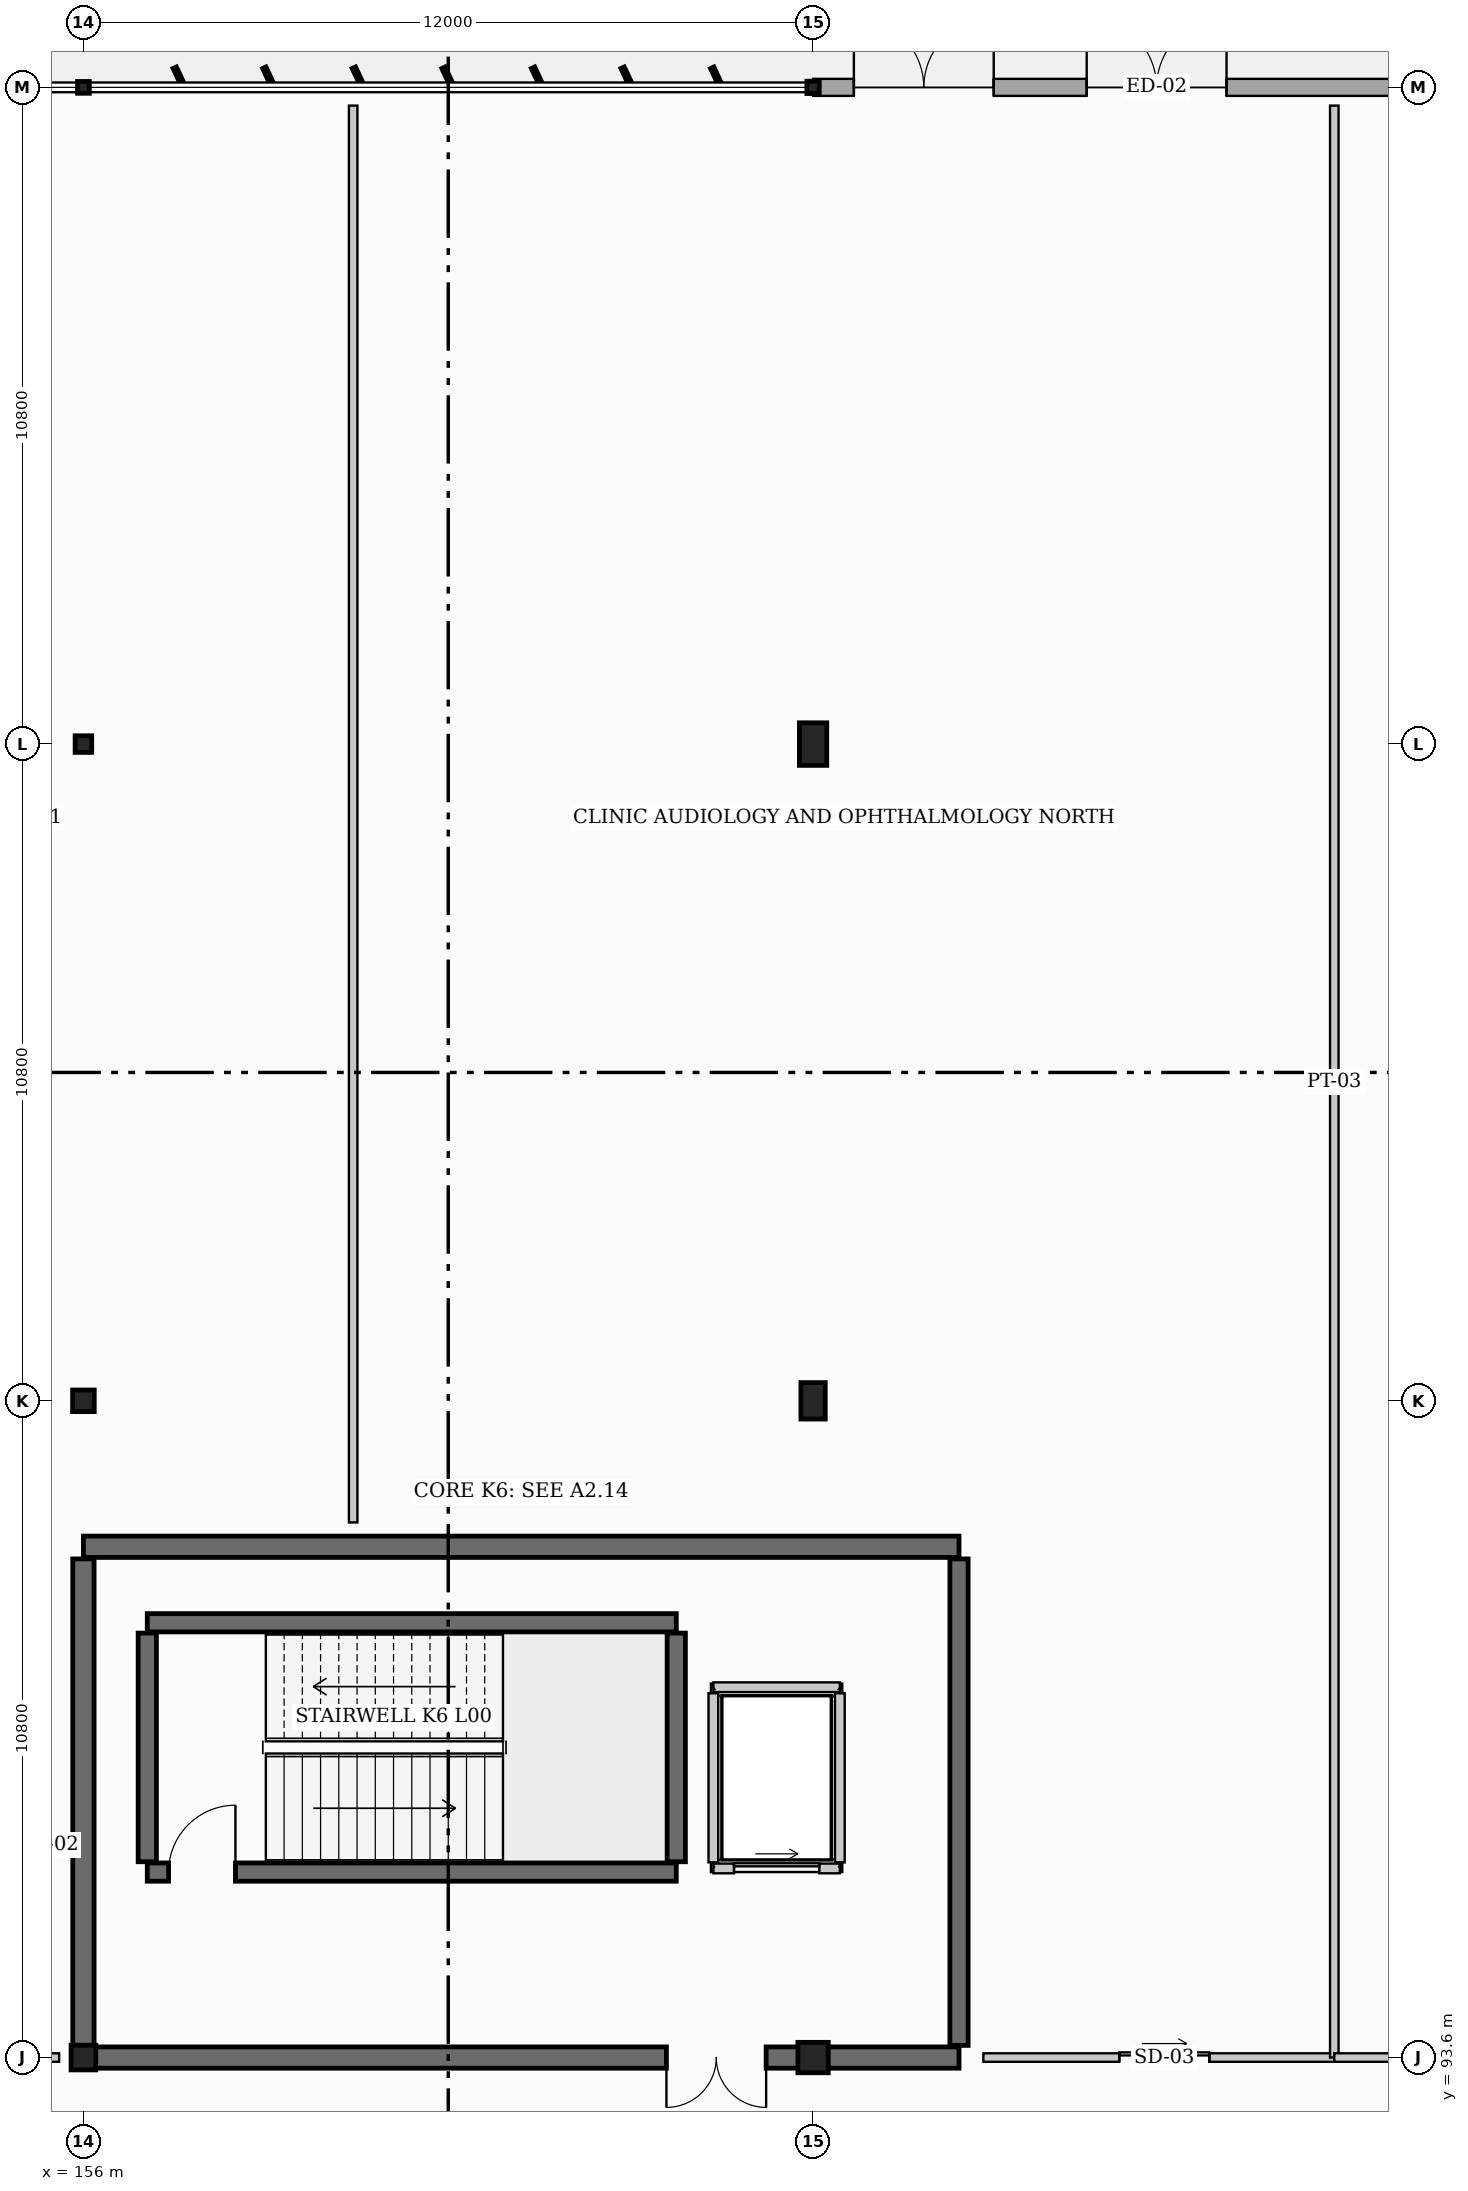
"""IFC4 building model, lengths in metres.
Left out: names, types, materials, properties, quantities, classifications, styles, units other than length and angle.
Written with IfcOpenShell. Run it as: python <this file> out.ifc"""

import sys

from ifc_helpers import new_model, si_unit, direction, frame, frame_2d, origin, origin_2d, place, context, subcontext, project, spatial, rectangle, hollow_circle, i_section, extrude, element, fill, save


model = new_model("IFC4")
c1 = context("Model", 3, precision=1e-05, world=origin(), true_north=direction((0.0, 1.0)))
c2 = subcontext(c1, "Body", "Model", "MODEL_VIEW")
j1 = project(units=[si_unit("LENGTHUNIT", "METRE"), si_unit("PLANEANGLEUNIT", "RADIAN")], contexts=[c1])
p1 = place(None, origin())
s1 = spatial("IfcSite", under=j1, at=p1, CompositionType="ELEMENT")
p2 = place(p1, origin())
s2 = spatial("IfcBuilding", under=s1, at=p2, CompositionType="ELEMENT")
p3 = place(p2, origin())
s3 = spatial("IfcBuildingStorey", under=s2, at=p3, CompositionType="ELEMENT", Elevation=0.0)
p4 = place(p3, frame((156.0, 93.6, 0.0), z_axis=(0.0, 0.0, 1.0), x_axis=(0.0, 1.0, 0.0)))
e1 = element("IfcColumn", 1, at=p4, inside=s3, PredefinedType="COLUMN", context=c2, shape_type="SweptSolid", body=[
    extrude(hollow_circle(Radius=0.203, WallThickness=0.016, at=origin_2d()), origin(), (0.0, 0.0, 1.0), 4.8),
])
p5 = place(p3, frame((156.0, 104.4, 0.0), z_axis=(0.0, 0.0, 1.0), x_axis=(0.0, 1.0, 0.0)))
e2 = element("IfcColumn", 2, at=p5, inside=s3, PredefinedType="COLUMN", context=c2, shape_type="SweptSolid", body=[
    extrude(hollow_circle(Radius=0.178, WallThickness=0.013, at=origin_2d()), origin(), (0.0, 0.0, 1.0), 4.8),
])
p6 = place(p3, frame((156.0, 115.2, 0.0), z_axis=(0.0, 0.0, 1.0), x_axis=(0.0, 1.0, 0.0)))
e3 = element("IfcColumn", 3, at=p6, inside=s3, PredefinedType="COLUMN", context=c2, shape_type="SweptSolid", body=[
    extrude(hollow_circle(Radius=0.136, WallThickness=0.013, at=origin_2d()), origin(), (0.0, 0.0, 1.0), 4.8),
])
p7 = place(p3, frame((156.0, 126.0, 0.0), z_axis=(0.0, 0.0, 1.0), x_axis=(0.0, 1.0, 0.0)))
e4 = element("IfcColumn", 4, at=p7, inside=s3, PredefinedType="COLUMN", context=c2, shape_type="SweptSolid", body=[
    extrude(hollow_circle(Radius=0.097, WallThickness=0.008, at=origin_2d()), origin(), (0.0, 0.0, 1.0), 4.8),
])
p8 = place(p3, frame((168.0, 93.6, 0.0), z_axis=(0.0, 0.0, 1.0), x_axis=(1.0, 0.0, 0.0)))
e5 = element("IfcColumn", 5, at=p8, inside=s3, PredefinedType="COLUMN", context=c2, shape_type="SweptSolid", body=[
    extrude(rectangle(XDim=0.5, YDim=0.5, at=origin_2d()), origin(), (0.0, 0.0, 1.0), 4.8),
])
p9 = place(p3, frame((168.0, 104.4, 0.0), z_axis=(0.0, 0.0, 1.0), x_axis=(1.0, 0.0, 0.0)))
e6 = element("IfcColumn", 6, at=p9, inside=s3, PredefinedType="PILASTER", context=c2, shape_type="SweptSolid", body=[
    extrude(rectangle(XDim=0.4, YDim=0.6, at=origin_2d()), origin(), (0.0, 0.0, 1.0), 4.8),
])
p10 = place(p3, frame((168.0, 115.2, 0.0), z_axis=(0.0, 0.0, 1.0), x_axis=(1.0, 0.0, 0.0)))
e7 = element("IfcColumn", 7, at=p10, inside=s3, PredefinedType="PILASTER", context=c2, shape_type="SweptSolid", body=[
    extrude(rectangle(XDim=0.45, YDim=0.7, at=origin_2d()), origin(), (0.0, 0.0, 1.0), 4.8),
])
p11 = place(p3, frame((168.0, 126.0, 0.0), z_axis=(0.0, 0.0, 1.0), x_axis=(1.0, 0.0, 0.0)))
e8 = element("IfcColumn", 8, at=p11, inside=s3, PredefinedType="COLUMN", context=c2, shape_type="SweptSolid", body=[
    extrude(i_section(OverallWidth=0.203, OverallDepth=0.203, WebThickness=0.007, FlangeThickness=0.011, at=origin_2d()), origin(), (0.0, 0.0, 1.0), 4.8),
])
p12 = place(p3, frame((156.0, 102.0, 0.0), z_axis=(0.0, 0.0, 1.0), x_axis=(1.0, 0.0, 0.0)))
e9 = element("IfcWall", 9, at=p12, inside=s3, PredefinedType="SHEAR", context=c2, shape_type="SweptSolid", body=[
    extrude(rectangle(XDim=14.4, YDim=0.35, at=frame_2d((7.2, 0.0))), origin(), (0.0, 0.0, 1.0), 4.8),
])
p13 = place(p3, frame((170.4, 93.6, 0.0), z_axis=(0.0, 0.0, 1.0), x_axis=(-1.0, 0.0, 0.0)))
e10 = element("IfcWall", 10, at=p13, inside=s3, PredefinedType="SHEAR", context=c2, shape_type="SweptSolid", body=[
    extrude(rectangle(XDim=14.4, YDim=0.35, at=frame_2d((7.2, 0.0))), origin(), (0.0, 0.0, 1.0), 4.8),
])
p14 = place(p13, frame((3.172, 0.0, 0.0)))
e11 = element("IfcOpeningElement", 11, at=p14, cuts=e10, PredefinedType="OPENING", context=c2, shape_type="SweptSolid", body=[
    extrude(rectangle(XDim=1.64, YDim=2.2, at=frame_2d((0.82, 1.1))), frame((0.0, 0.185, 0.0), z_axis=(0.0, -1.0, 0.0), x_axis=(1.0, 0.0, 0.0)), (0.0, 0.0, 1.0), 0.37),
])
p15 = place(p3, frame((156.0, 93.8, 0.0), z_axis=(0.0, 0.0, 1.0), x_axis=(0.0, 1.0, 0.0)))
e12 = element("IfcWall", 12, at=p15, inside=s3, PredefinedType="SHEAR", context=c2, shape_type="SweptSolid", body=[
    extrude(rectangle(XDim=8.0, YDim=0.35, at=frame_2d((4.0, 0.0))), origin(), (0.0, 0.0, 1.0), 4.8),
])
p16 = place(p3, frame((170.4, 101.8, 0.0), z_axis=(0.0, 0.0, 1.0), x_axis=(0.0, -1.0, 0.0)))
e13 = element("IfcWall", 13, at=p16, inside=s3, PredefinedType="SHEAR", context=c2, shape_type="SweptSolid", body=[
    extrude(rectangle(XDim=8.0, YDim=0.3, at=frame_2d((4.0, 0.0))), origin(), (0.0, 0.0, 1.0), 4.8),
])
p17 = place(p3, frame((157.05, 96.65, 0.0), z_axis=(0.0, 0.0, 1.0), x_axis=(1.0, 0.0, 0.0)))
e14 = element("IfcWall", 14, at=p17, inside=s3, PredefinedType="SHEAR", context=c2, shape_type="SweptSolid", body=[
    extrude(rectangle(XDim=8.7, YDim=0.3, at=frame_2d((4.35, 0.0))), origin(), (0.0, 0.0, 1.0), 4.8),
])
p18 = place(p17, frame((0.35, 0.0, 0.0)))
e15 = element("IfcOpeningElement", 15, at=p18, cuts=e14, PredefinedType="OPENING", context=c2, shape_type="SweptSolid", body=[
    extrude(rectangle(XDim=1.1, YDim=2.15, at=frame_2d((0.55, 1.075))), frame((0.0, 0.16, 0.0), z_axis=(0.0, -1.0, 0.0), x_axis=(1.0, 0.0, 0.0)), (0.0, 0.0, 1.0), 0.32),
])
p19 = place(p3, frame((165.75, 100.75, 0.0), z_axis=(0.0, 0.0, 1.0), x_axis=(-1.0, 0.0, 0.0)))
e16 = element("IfcWall", 16, at=p19, inside=s3, PredefinedType="SHEAR", context=c2, shape_type="SweptSolid", body=[
    extrude(rectangle(XDim=8.7, YDim=0.3, at=frame_2d((4.35, 0.0))), origin(), (0.0, 0.0, 1.0), 4.8),
])
for number, where, z_axis, x_axis in (
    (17, (157.05, 96.82, 0.0), (0.0, 0.0, 1.0), (0.0, 1.0, 0.0)),
    (18, (165.75, 96.82, 0.0), (0.0, 0.0, 1.0), (0.0, 1.0, 0.0)),
):
    element("IfcWall", number, at=place(p3, frame(where, z_axis=z_axis, x_axis=x_axis)), inside=s3, PredefinedType="SHEAR", context=c2, shape_type="SweptSolid", body=[
        extrude(rectangle(XDim=3.76, YDim=0.3, at=frame_2d((1.88, 0.0))), origin(), (0.0, 0.0, 1.0), 4.8),
    ])
p20 = place(p3, frame((168.0, 126.0, 0.0), z_axis=(0.0, 0.0, 1.0), x_axis=(1.0, 0.0, 0.0)))
e19 = element("IfcWall", 19, at=p20, inside=s3, PredefinedType="STANDARD", context=c2, shape_type="SweptSolid", body=[
    extrude(rectangle(XDim=24.0, YDim=0.28, at=frame_2d((12.0, 0.0))), origin(), (0.0, 0.0, 1.0), 3.53),
])
p21 = place(p20, frame((4.5, 0.0, 0.0)))
e20 = element("IfcOpeningElement", 20, at=p21, cuts=e19, PredefinedType="OPENING", context=c2, shape_type="SweptSolid", body=[
    extrude(rectangle(XDim=2.3, YDim=2.3, at=frame_2d((1.15, 1.15))), frame((0.0, 0.15, 0.0), z_axis=(0.0, -1.0, 0.0), x_axis=(1.0, 0.0, 0.0)), (0.0, 0.0, 1.0), 0.3),
])
p22 = place(p20, frame((0.671, 0.0, 0.0)))
e21 = element("IfcOpeningElement", 21, at=p22, cuts=e19, PredefinedType="OPENING", context=c2, shape_type="SweptSolid", body=[
    extrude(rectangle(XDim=2.3, YDim=2.3, at=frame_2d((1.15, 1.15))), frame((0.0, 0.15, 0.0), z_axis=(0.0, -1.0, 0.0), x_axis=(1.0, 0.0, 0.0)), (0.0, 0.0, 1.0), 0.3),
])
p23 = place(p20, frame((15.2, 0.0, 0.95)))
e22 = element("IfcOpeningElement", 22, at=p23, cuts=e19, PredefinedType="OPENING", context=c2, shape_type="SweptSolid", body=[
    extrude(rectangle(XDim=3.2, YDim=2.1, at=frame_2d((1.6, 1.05))), frame((0.0, 0.15, 0.0), z_axis=(0.0, -1.0, 0.0), x_axis=(1.0, 0.0, 0.0)), (0.0, 0.0, 1.0), 0.3),
])
p24 = place(p3, frame((166.36, 96.71, 0.0), z_axis=(0.0, 0.0, 1.0), x_axis=(1.0, 0.0, 0.0)))
e23 = element("IfcWall", 23, at=p24, inside=s3, PredefinedType="PARTITIONING", context=c2, shape_type="SweptSolid", body=[
    extrude(rectangle(XDim=2.08, YDim=0.16, at=frame_2d((1.04, 0.0))), origin(), (0.0, 0.0, 1.0), 4.445),
])
p25 = place(p24, frame((0.34, 0.0, 0.0)))
e24 = element("IfcOpeningElement", 24, at=p25, cuts=e23, PredefinedType="OPENING", context=c2, shape_type="SweptSolid", body=[
    extrude(rectangle(XDim=1.4, YDim=2.2, at=frame_2d((0.7, 1.1))), frame((0.0, 0.09, 0.0), z_axis=(0.0, -1.0, 0.0), x_axis=(1.0, 0.0, 0.0)), (0.0, 0.0, 1.0), 0.18),
])
p26 = place(p3, frame((168.44, 99.69, 0.0), z_axis=(0.0, 0.0, 1.0), x_axis=(-1.0, 0.0, 0.0)))
e25 = element("IfcWall", 25, at=p26, inside=s3, PredefinedType="PARTITIONING", context=c2, shape_type="SweptSolid", body=[
    extrude(rectangle(XDim=2.08, YDim=0.16, at=frame_2d((1.04, 0.0))), origin(), (0.0, 0.0, 1.0), 4.445),
])
for number, where, z_axis, x_axis in (
    (26, (166.36, 99.59, 0.0), (0.0, 0.0, 1.0), (0.0, -1.0, 0.0)),
    (27, (168.44, 96.81, 0.0), (0.0, 0.0, 1.0), (0.0, 1.0, 0.0)),
):
    element("IfcWall", number, at=place(p3, frame(where, z_axis=z_axis, x_axis=x_axis)), inside=s3, PredefinedType="PARTITIONING", context=c2, shape_type="SweptSolid", body=[
        extrude(rectangle(XDim=2.78, YDim=0.16, at=frame_2d((1.39, 0.0))), origin(), (0.0, 0.0, 1.0), 4.445),
    ])
p27 = place(p3, frame((144.3, 93.6, 0.0), z_axis=(0.0, 0.0, 1.0), x_axis=(1.0, 0.0, 0.0)))
e28 = element("IfcWall", 28, at=p27, inside=s3, PredefinedType="PARTITIONING", context=c2, shape_type="SweptSolid", body=[
    extrude(rectangle(XDim=11.3, YDim=0.14, at=frame_2d((5.65, 0.0))), origin(), (0.0, 0.0, 1.0), 3.897),
])
p28 = place(p27, frame((5.0, 0.0, 0.0)))
e29 = element("IfcOpeningElement", 29, at=p28, cuts=e28, PredefinedType="OPENING", context=c2, shape_type="SweptSolid", body=[
    extrude(rectangle(XDim=1.62, YDim=2.3, at=frame_2d((0.81, 1.15))), frame((0.0, 0.08, 0.0), z_axis=(0.0, -1.0, 0.0), x_axis=(1.0, 0.0, 0.0)), (0.0, 0.0, 1.0), 0.16),
])
p29 = place(p3, frame((160.436, 102.4, 0.0), z_axis=(0.0, 0.0, 1.0), x_axis=(0.0, 1.0, 0.0)))
e30 = element("IfcWall", 30, at=p29, inside=s3, PredefinedType="PARTITIONING", context=c2, shape_type="SweptSolid", body=[
    extrude(rectangle(XDim=23.3, YDim=0.14, at=frame_2d((11.65, 0.0))), origin(), (0.0, 0.0, 1.0), 3.973),
])
p30 = place(p3, frame((170.8, 93.6, 0.0), z_axis=(0.0, 0.0, 1.0), x_axis=(1.0, 0.0, 0.0)))
e31 = element("IfcWall", 31, at=p30, inside=s3, PredefinedType="PARTITIONING", context=c2, shape_type="SweptSolid", body=[
    extrude(rectangle(XDim=5.772, YDim=0.14, at=frame_2d((2.886, 0.0))), origin(), (0.0, 0.0, 1.0), 3.973),
])
p31 = place(p30, frame((2.236, 0.0, 0.0)))
e32 = element("IfcOpeningElement", 32, at=p31, cuts=e31, PredefinedType="OPENING", context=c2, shape_type="SweptSolid", body=[
    extrude(rectangle(XDim=1.48, YDim=2.26, at=frame_2d((0.74, 1.13))), frame((0.0, 0.08, 0.0), z_axis=(0.0, -1.0, 0.0), x_axis=(1.0, 0.0, 0.0)), (0.0, 0.0, 1.0), 0.16),
])
p32 = place(p3, frame((176.572, 93.6, 0.0), z_axis=(0.0, 0.0, 1.0), x_axis=(0.0, 1.0, 0.0)))
e33 = element("IfcWall", 33, at=p32, inside=s3, PredefinedType="PARTITIONING", context=c2, shape_type="SweptSolid", body=[
    extrude(rectangle(XDim=32.1, YDim=0.14, at=frame_2d((16.05, 0.0))), origin(), (0.0, 0.0, 1.0), 3.48),
])
p33 = place(p3, frame((176.572, 93.6, 0.0), z_axis=(0.0, 0.0, 1.0), x_axis=(1.0, 0.0, 0.0)))
e34 = element("IfcWall", 34, at=p33, inside=s3, PredefinedType="PARTITIONING", context=c2, shape_type="SweptSolid", body=[
    extrude(rectangle(XDim=10.085, YDim=0.14, at=frame_2d((5.042, 0.0))), origin(), (0.0, 0.0, 1.0), 3.53),
])
p34 = place(p33, frame((4.393, 0.0, 0.0)))
e35 = element("IfcOpeningElement", 35, at=p34, cuts=e34, PredefinedType="OPENING", context=c2, shape_type="SweptSolid", body=[
    extrude(rectangle(XDim=1.36, YDim=2.18, at=frame_2d((0.68, 1.09))), frame((0.0, 0.08, 0.0), z_axis=(0.0, -1.0, 0.0), x_axis=(1.0, 0.0, 0.0)), (0.0, 0.0, 1.0), 0.16),
])
p35 = place(p21, origin())
e36 = element("IfcDoor", 36, at=p35, inside=s3, OperationType="DOUBLE_DOOR_SINGLE_SWING", PredefinedType="DOOR", context=c2, shape_type="SweptSolid", body=[
    extrude(rectangle(XDim=2.3, YDim=2.3, at=frame_2d((1.15, 1.15))), frame((0.0, 0.025, 0.0), z_axis=(0.0, -1.0, 0.0), x_axis=(1.0, 0.0, 0.0)), (0.0, 0.0, 1.0), 0.05),
])
fill(e20, e36)
p36 = place(p22, origin())
e37 = element("IfcDoor", 37, at=p36, inside=s3, OperationType="DOUBLE_DOOR_SINGLE_SWING", PredefinedType="DOOR", context=c2, shape_type="SweptSolid", body=[
    extrude(rectangle(XDim=2.3, YDim=2.3, at=frame_2d((1.15, 1.15))), frame((0.0, 0.025, 0.0), z_axis=(0.0, -1.0, 0.0), x_axis=(1.0, 0.0, 0.0)), (0.0, 0.0, 1.0), 0.05),
])
fill(e21, e37)
p37 = place(p25, origin())
e38 = element("IfcDoor", 38, at=p37, inside=s3, OperationType="SLIDING_TO_LEFT", PredefinedType="DOOR", context=c2, shape_type="SweptSolid", body=[
    extrude(rectangle(XDim=1.4, YDim=2.2, at=frame_2d((0.7, 1.1))), frame((0.0, 0.025, 0.0), z_axis=(0.0, -1.0, 0.0), x_axis=(1.0, 0.0, 0.0)), (0.0, 0.0, 1.0), 0.05),
])
fill(e24, e38)
p38 = place(p18, origin())
e39 = element("IfcDoor", 39, at=p38, inside=s3, OperationType="SINGLE_SWING_RIGHT", PredefinedType="DOOR", context=c2, shape_type="SweptSolid", body=[
    extrude(rectangle(XDim=1.1, YDim=2.15, at=frame_2d((0.55, 1.075))), frame((0.0, 0.025, 0.0), z_axis=(0.0, -1.0, 0.0), x_axis=(1.0, 0.0, 0.0)), (0.0, 0.0, 1.0), 0.05),
])
fill(e15, e39)
p39 = place(p14, origin())
e40 = element("IfcDoor", 40, at=p39, inside=s3, OperationType="DOUBLE_DOOR_SINGLE_SWING", PredefinedType="DOOR", context=c2, shape_type="SweptSolid", body=[
    extrude(rectangle(XDim=1.64, YDim=2.2, at=frame_2d((0.82, 1.1))), frame((0.0, 0.025, 0.0), z_axis=(0.0, -1.0, 0.0), x_axis=(1.0, 0.0, 0.0)), (0.0, 0.0, 1.0), 0.05),
])
fill(e11, e40)
p40 = place(p31, origin())
e41 = element("IfcDoor", 41, at=p40, inside=s3, OperationType="SLIDING_TO_LEFT", PredefinedType="DOOR", context=c2, shape_type="SweptSolid", body=[
    extrude(rectangle(XDim=1.48, YDim=2.26, at=frame_2d((0.74, 1.13))), frame((0.0, 0.025, 0.0), z_axis=(0.0, -1.0, 0.0), x_axis=(1.0, 0.0, 0.0)), (0.0, 0.0, 1.0), 0.05),
])
fill(e32, e41)
save(model, sys.argv[1])
